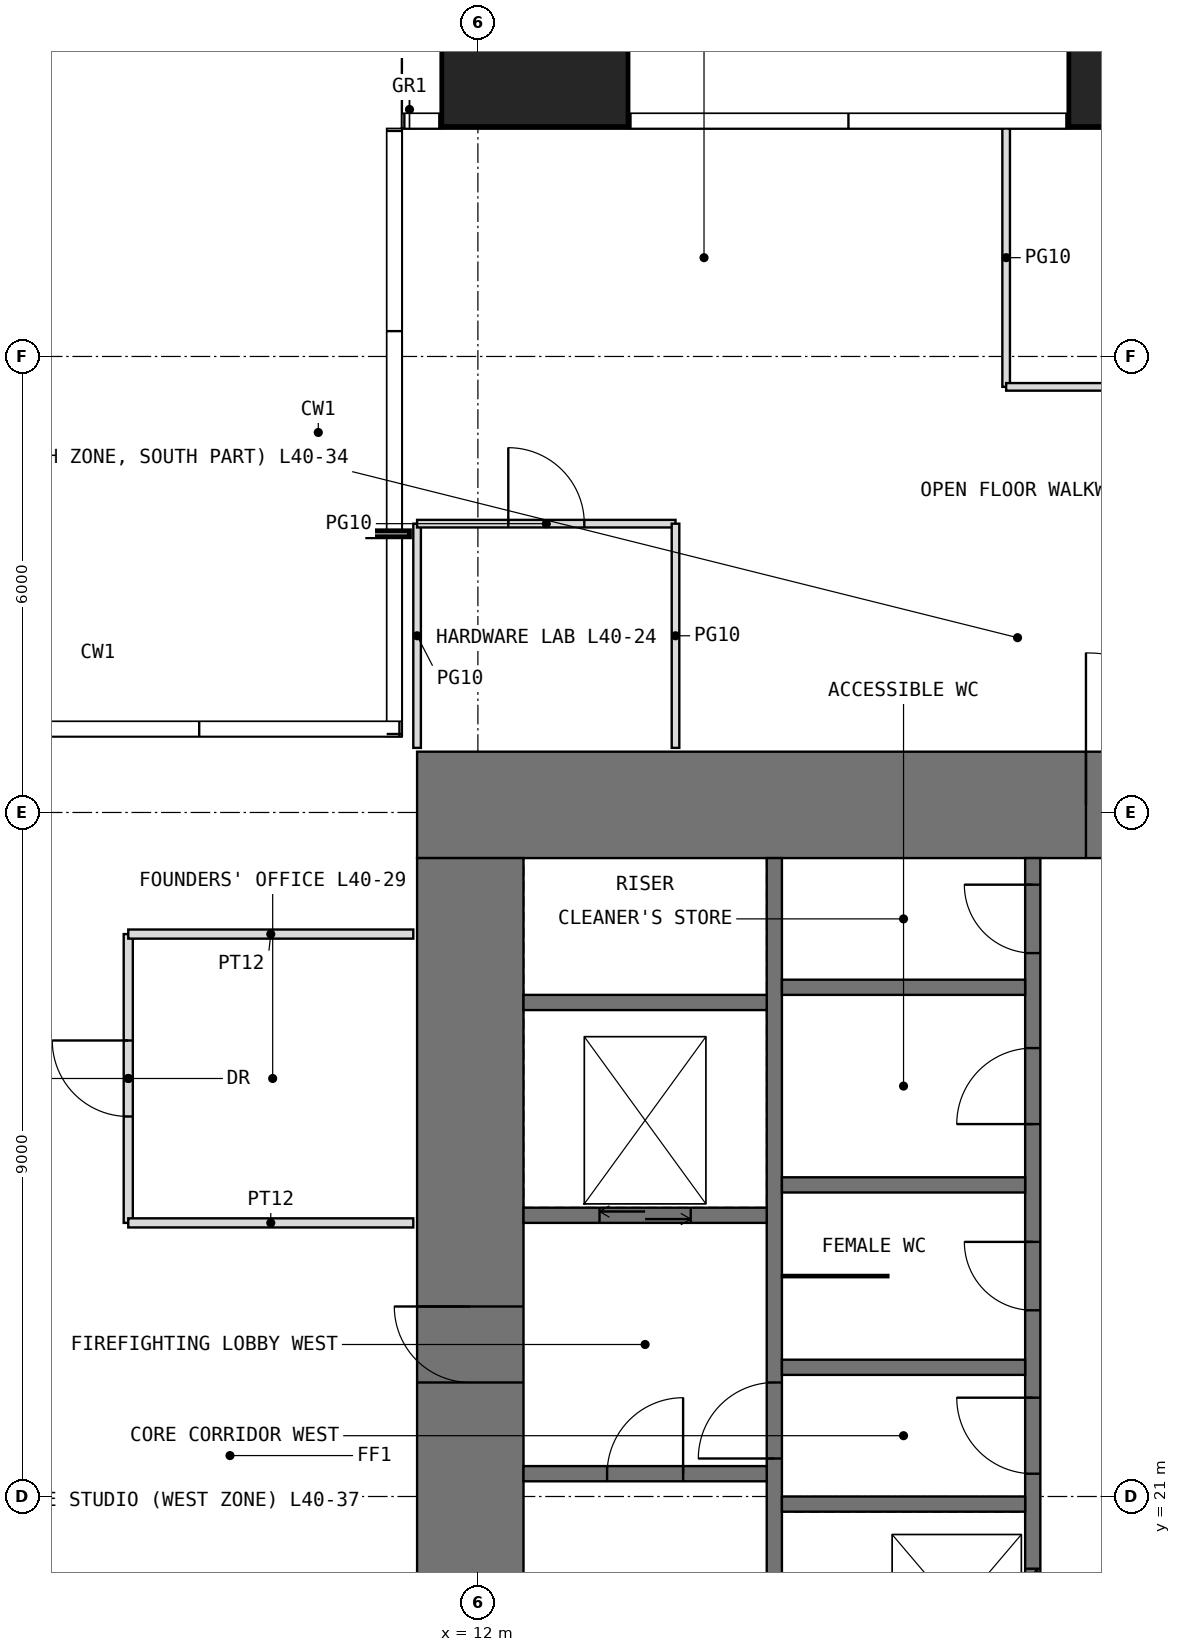
"""IFC4 building model, lengths in metres.
Left out: names, types, materials, properties, quantities, classifications, styles, units other than length and angle.
Written with IfcOpenShell. Run it as: python <this file> out.ifc"""

import sys

from ifc_helpers import new_model, si_unit, direction, frame, frame_2d, origin, origin_2d, place, context, subcontext, project, spatial, rectangle, extrude, element, fill, save


model = new_model("IFC4")
c1 = context("Model", 3, precision=1e-05, world=origin(), true_north=direction((0.0, 1.0)))
c2 = subcontext(c1, "Body", "Model", "MODEL_VIEW")
j1 = project(units=[si_unit("LENGTHUNIT", "METRE"), si_unit("PLANEANGLEUNIT", "RADIAN")], contexts=[c1])
p1 = place(None, origin())
s1 = spatial("IfcSite", under=j1, at=p1, CompositionType="ELEMENT")
p2 = place(p1, origin())
s2 = spatial("IfcBuilding", under=s1, at=p2, CompositionType="ELEMENT")
p3 = place(p2, frame((0.0, 0.0, 170.5)))
s3 = spatial("IfcBuildingStorey", under=s2, at=p3, CompositionType="ELEMENT", Elevation=170.5)
for number, where, z_axis, x_axis in (
    (1, (12.75, 40.25, 0.0), (0.0, 0.0, 1.0), (1.0, 0.0, 0.0)),
    (2, (21.0, 40.25, 0.0), (0.0, 0.0, 1.0), (1.0, 0.0, 0.0)),
):
    element("IfcColumn", number, at=place(p3, frame(where, z_axis=z_axis, x_axis=x_axis)), inside=s3, PredefinedType="COLUMN", context=c2, shape_type="SweptSolid", body=[
        extrude(rectangle(XDim=2.45, YDim=2.45, at=origin_2d()), origin(), (0.0, 0.0, 1.0), 4.0),
    ])
p4 = place(p3, frame((11.2, 30.1, -0.05), z_axis=(0.0, 0.0, 1.0), x_axis=(1.0, 0.0, 0.0)))
e3 = element("IfcWall", 3, at=p4, inside=s3, PredefinedType="SHEAR", context=c2, shape_type="SweptSolid", body=[
    extrude(rectangle(XDim=19.6, YDim=1.4, at=frame_2d((9.8, 0.0))), origin(), (0.0, 0.0, 1.0), 4.0),
])
p5 = place(p4, frame((8.8, 0.0, 0.05)))
e4 = element("IfcOpeningElement", 4, at=p5, cuts=e3, PredefinedType="OPENING", context=c2, shape_type="SweptSolid", body=[
    extrude(rectangle(XDim=2.0, YDim=2.2, at=frame_2d((1.0, 1.1))), frame((0.0, 0.71, 0.0), z_axis=(0.0, -1.0, 0.0), x_axis=(1.0, 0.0, 0.0)), (0.0, 0.0, 1.0), 1.42),
])
p6 = place(p3, frame((11.9, 12.6, -0.05), z_axis=(0.0, 0.0, 1.0), x_axis=(0.0, 1.0, 0.0)))
e5 = element("IfcWall", 5, at=p6, inside=s3, PredefinedType="SHEAR", context=c2, shape_type="SweptSolid", body=[
    extrude(rectangle(XDim=16.8, YDim=1.4, at=frame_2d((8.4, 0.0))), origin(), (0.0, 0.0, 1.0), 4.0),
])
p7 = place(p6, frame((9.9, 0.0, 0.05)))
e6 = element("IfcOpeningElement", 6, at=p7, cuts=e5, PredefinedType="OPENING", context=c2, shape_type="SweptSolid", body=[
    extrude(rectangle(XDim=1.0, YDim=2.2, at=frame_2d((0.5, 1.1))), frame((0.0, 0.71, 0.0), z_axis=(0.0, -1.0, 0.0), x_axis=(1.0, 0.0, 0.0)), (0.0, 0.0, 1.0), 1.42),
])
p8 = place(p3, frame((15.9, 12.6, -0.05), z_axis=(0.0, 0.0, 1.0), x_axis=(0.0, 1.0, 0.0)))
e7 = element("IfcWall", 7, at=p8, inside=s3, PredefinedType="SHEAR", context=c2, shape_type="SweptSolid", body=[
    extrude(rectangle(XDim=16.8, YDim=0.2, at=frame_2d((8.4, 0.0))), origin(), (0.0, 0.0, 1.0), 4.0),
])
p9 = place(p8, frame((8.9, 0.0, 0.05)))
e8 = element("IfcOpeningElement", 8, at=p9, cuts=e7, PredefinedType="OPENING", context=c2, shape_type="SweptSolid", body=[
    extrude(rectangle(XDim=1.0, YDim=2.2, at=frame_2d((0.5, 1.1))), frame((0.0, 0.11, 0.0), z_axis=(0.0, -1.0, 0.0), x_axis=(1.0, 0.0, 0.0)), (0.0, 0.0, 1.0), 0.22),
])
p10 = place(p3, frame((19.3, 12.6, -0.05), z_axis=(0.0, 0.0, 1.0), x_axis=(0.0, 1.0, 0.0)))
e9 = element("IfcWall", 9, at=p10, inside=s3, PredefinedType="SHEAR", context=c2, shape_type="SweptSolid", body=[
    extrude(rectangle(XDim=16.8, YDim=0.2, at=frame_2d((8.4, 0.0))), origin(), (0.0, 0.0, 1.0), 4.0),
])
p11 = place(p10, frame((8.7, 0.0, 0.05)))
e10 = element("IfcOpeningElement", 10, at=p11, cuts=e9, PredefinedType="OPENING", context=c2, shape_type="SweptSolid", body=[
    extrude(rectangle(XDim=1.0, YDim=2.2, at=frame_2d((0.5, 1.1))), frame((0.0, 0.11, 0.0), z_axis=(0.0, -1.0, 0.0), x_axis=(1.0, 0.0, 0.0)), (0.0, 0.0, 1.0), 0.22),
])
p12 = place(p10, frame((10.85, 0.0, 0.05)))
e11 = element("IfcOpeningElement", 11, at=p12, cuts=e9, PredefinedType="OPENING", context=c2, shape_type="SweptSolid", body=[
    extrude(rectangle(XDim=0.9, YDim=2.2, at=frame_2d((0.45, 1.1))), frame((0.0, 0.11, 0.0), z_axis=(0.0, -1.0, 0.0), x_axis=(1.0, 0.0, 0.0)), (0.0, 0.0, 1.0), 0.22),
])
p13 = place(p10, frame((13.3, 0.0, 0.05)))
e12 = element("IfcOpeningElement", 12, at=p13, cuts=e9, PredefinedType="OPENING", context=c2, shape_type="SweptSolid", body=[
    extrude(rectangle(XDim=1.0, YDim=2.2, at=frame_2d((0.5, 1.1))), frame((0.0, 0.11, 0.0), z_axis=(0.0, -1.0, 0.0), x_axis=(1.0, 0.0, 0.0)), (0.0, 0.0, 1.0), 0.22),
])
p14 = place(p10, frame((15.55, 0.0, 0.05)))
e13 = element("IfcOpeningElement", 13, at=p14, cuts=e9, PredefinedType="OPENING", context=c2, shape_type="SweptSolid", body=[
    extrude(rectangle(XDim=0.9, YDim=2.2, at=frame_2d((0.45, 1.1))), frame((0.0, 0.11, 0.0), z_axis=(0.0, -1.0, 0.0), x_axis=(1.0, 0.0, 0.0)), (0.0, 0.0, 1.0), 0.22),
])
p15 = place(p10, frame((0.75, 0.0, 0.05)))
e14 = element("IfcOpeningElement", 14, at=p15, cuts=e9, PredefinedType="OPENING", context=c2, shape_type="SweptSolid", body=[
    extrude(rectangle(XDim=1.1, YDim=2.2, at=frame_2d((0.55, 1.1))), frame((0.0, 0.11, 0.0), z_axis=(0.0, -1.0, 0.0), x_axis=(1.0, 0.0, 0.0)), (0.0, 0.0, 1.0), 0.22),
])
p16 = place(p10, frame((3.55, 0.0, 0.05)))
e15 = element("IfcOpeningElement", 15, at=p16, cuts=e9, PredefinedType="OPENING", context=c2, shape_type="SweptSolid", body=[
    extrude(rectangle(XDim=1.1, YDim=2.2, at=frame_2d((0.55, 1.1))), frame((0.0, 0.11, 0.0), z_axis=(0.0, -1.0, 0.0), x_axis=(1.0, 0.0, 0.0)), (0.0, 0.0, 1.0), 0.22),
])
p17 = place(p10, frame((6.35, 0.0, 0.05)))
e16 = element("IfcOpeningElement", 16, at=p17, cuts=e9, PredefinedType="OPENING", context=c2, shape_type="SweptSolid", body=[
    extrude(rectangle(XDim=1.1, YDim=2.2, at=frame_2d((0.55, 1.1))), frame((0.0, 0.11, 0.0), z_axis=(0.0, -1.0, 0.0), x_axis=(1.0, 0.0, 0.0)), (0.0, 0.0, 1.0), 0.22),
])
p18 = place(p3, frame((12.6, 21.3, -0.05), z_axis=(0.0, 0.0, 1.0), x_axis=(1.0, 0.0, 0.0)))
e17 = element("IfcWall", 17, at=p18, inside=s3, PredefinedType="SHEAR", context=c2, shape_type="SweptSolid", body=[
    extrude(rectangle(XDim=3.2, YDim=0.2, at=frame_2d((1.6, 0.0))), origin(), (0.0, 0.0, 1.0), 4.0),
])
p19 = place(p18, frame((1.1, 0.0, 0.05)))
e18 = element("IfcOpeningElement", 18, at=p19, cuts=e17, PredefinedType="OPENING", context=c2, shape_type="SweptSolid", body=[
    extrude(rectangle(XDim=1.0, YDim=2.2, at=frame_2d((0.5, 1.1))), frame((0.0, 0.11, 0.0), z_axis=(0.0, -1.0, 0.0), x_axis=(1.0, 0.0, 0.0)), (0.0, 0.0, 1.0), 0.22),
])
p20 = place(p3, frame((12.6, 24.7, -0.05), z_axis=(0.0, 0.0, 1.0), x_axis=(1.0, 0.0, 0.0)))
e19 = element("IfcWall", 19, at=p20, inside=s3, PredefinedType="SHEAR", context=c2, shape_type="SweptSolid", body=[
    extrude(rectangle(XDim=3.2, YDim=0.2, at=frame_2d((1.6, 0.0))), origin(), (0.0, 0.0, 1.0), 4.0),
])
p21 = place(p20, frame((1.0, 0.0, 0.05)))
e20 = element("IfcOpeningElement", 20, at=p21, cuts=e19, PredefinedType="OPENING", context=c2, shape_type="SweptSolid", body=[
    extrude(rectangle(XDim=1.2, YDim=2.2, at=frame_2d((0.6, 1.1))), frame((0.0, 0.11, 0.0), z_axis=(0.0, -1.0, 0.0), x_axis=(1.0, 0.0, 0.0)), (0.0, 0.0, 1.0), 0.22),
])
for number, where, z_axis, x_axis in (
    (21, (12.6, 27.5, -0.05), (0.0, 0.0, 1.0), (1.0, 0.0, 0.0)),
    (22, (16.0, 20.9, -0.05), (0.0, 0.0, 1.0), (1.0, 0.0, 0.0)),
    (23, (16.0, 22.7, -0.05), (0.0, 0.0, 1.0), (1.0, 0.0, 0.0)),
    (24, (16.0, 25.1, -0.05), (0.0, 0.0, 1.0), (1.0, 0.0, 0.0)),
    (25, (16.0, 27.7, -0.05), (0.0, 0.0, 1.0), (1.0, 0.0, 0.0)),
):
    element("IfcWall", number, at=place(p3, frame(where, z_axis=z_axis, x_axis=x_axis)), inside=s3, PredefinedType="SHEAR", context=c2, shape_type="SweptSolid", body=[
        extrude(rectangle(XDim=3.2, YDim=0.2, at=frame_2d((1.6, 0.0))), origin(), (0.0, 0.0, 1.0), 4.0),
    ])
p22 = place(p3, frame((16.0, 23.9, 0.0), z_axis=(0.0, 0.0, 1.0), x_axis=(1.0, 0.0, 0.0)))
e26 = element("IfcWall", 26, at=p22, inside=s3, PredefinedType="PARTITIONING", context=c2, shape_type="SweptSolid", body=[
    extrude(rectangle(XDim=1.4, YDim=0.03, at=frame_2d((0.7, 0.0))), origin(), (0.0, 0.0, 1.0), 3.75),
])
p23 = place(p3, frame((7.4, 24.6, 0.0), z_axis=(0.0, 0.0, 1.0), x_axis=(0.0, 1.0, 0.0)))
e27 = element("IfcWall", 27, at=p23, inside=s3, PredefinedType="PARTITIONING", context=c2, shape_type="SweptSolid", body=[
    extrude(rectangle(XDim=3.8, YDim=0.12, at=frame_2d((1.9, 0.0))), origin(), (0.0, 0.0, 1.0), 3.75),
])
p24 = place(p23, frame((1.4, 0.0, 0.0)))
e28 = element("IfcOpeningElement", 28, at=p24, cuts=e27, PredefinedType="OPENING", context=c2, shape_type="SweptSolid", body=[
    extrude(rectangle(XDim=1.0, YDim=2.2, at=frame_2d((0.5, 1.1))), frame((0.0, 0.07, 0.0), z_axis=(0.0, -1.0, 0.0), x_axis=(1.0, 0.0, 0.0)), (0.0, 0.0, 1.0), 0.14),
])
for number, where, z_axis, x_axis in (
    (29, (7.4, 24.6, 0.0), (0.0, 0.0, 1.0), (1.0, 0.0, 0.0)),
    (30, (7.4, 28.4, 0.0), (0.0, 0.0, 1.0), (1.0, 0.0, 0.0)),
):
    element("IfcWall", number, at=place(p3, frame(where, z_axis=z_axis, x_axis=x_axis)), inside=s3, PredefinedType="PARTITIONING", context=c2, shape_type="SweptSolid", body=[
        extrude(rectangle(XDim=3.75, YDim=0.12, at=frame_2d((1.875, 0.0))), origin(), (0.0, 0.0, 1.0), 3.75),
    ])
p25 = place(p3, frame((11.2, 30.85, 0.0), z_axis=(0.0, 0.0, 1.0), x_axis=(0.0, 1.0, 0.0)))
e31 = element("IfcWall", 31, at=p25, inside=s3, PredefinedType="PARTITIONING", context=c2, shape_type="SweptSolid", body=[
    extrude(rectangle(XDim=2.95, YDim=0.1, at=frame_2d((1.475, 0.0))), origin(), (0.0, 0.0, 1.0), 3.75),
])
p26 = place(p3, frame((11.2, 33.8, 0.0), z_axis=(0.0, 0.0, 1.0), x_axis=(1.0, 0.0, 0.0)))
e32 = element("IfcWall", 32, at=p26, inside=s3, PredefinedType="PARTITIONING", context=c2, shape_type="SweptSolid", body=[
    extrude(rectangle(XDim=3.4, YDim=0.1, at=frame_2d((1.7, 0.0))), origin(), (0.0, 0.0, 1.0), 3.75),
])
p27 = place(p26, frame((1.2, 0.0, 0.0)))
e33 = element("IfcOpeningElement", 33, at=p27, cuts=e32, PredefinedType="OPENING", context=c2, shape_type="SweptSolid", body=[
    extrude(rectangle(XDim=1.0, YDim=2.4, at=frame_2d((0.5, 1.2))), frame((0.0, 0.06, 0.0), z_axis=(0.0, -1.0, 0.0), x_axis=(1.0, 0.0, 0.0)), (0.0, 0.0, 1.0), 0.12),
])
p28 = place(p3, frame((14.6, 30.85, 0.0), z_axis=(0.0, 0.0, 1.0), x_axis=(0.0, 1.0, 0.0)))
e34 = element("IfcWall", 34, at=p28, inside=s3, PredefinedType="PARTITIONING", context=c2, shape_type="SweptSolid", body=[
    extrude(rectangle(XDim=2.95, YDim=0.1, at=frame_2d((1.475, 0.0))), origin(), (0.0, 0.0, 1.0), 3.75),
])
p29 = place(p3, frame((18.95, 35.6, 0.0), z_axis=(0.0, 0.0, 1.0), x_axis=(0.0, 1.0, 0.0)))
e35 = element("IfcWall", 35, at=p29, inside=s3, PredefinedType="PARTITIONING", context=c2, shape_type="SweptSolid", body=[
    extrude(rectangle(XDim=3.4, YDim=0.1, at=frame_2d((1.7, 0.0))), origin(), (0.0, 0.0, 1.0), 3.75),
])
p30 = place(p3, frame((18.95, 35.6, 0.0), z_axis=(0.0, 0.0, 1.0), x_axis=(1.0, 0.0, 0.0)))
e36 = element("IfcWall", 36, at=p30, inside=s3, PredefinedType="PARTITIONING", context=c2, shape_type="SweptSolid", body=[
    extrude(rectangle(XDim=9.25, YDim=0.1, at=frame_2d((4.625, 0.0))), origin(), (0.0, 0.0, 1.0), 3.75),
])
p31 = place(p30, frame((3.725, 0.0, 0.0)))
e37 = element("IfcOpeningElement", 37, at=p31, cuts=e36, PredefinedType="OPENING", context=c2, shape_type="SweptSolid", body=[
    extrude(rectangle(XDim=1.0, YDim=2.4, at=frame_2d((0.5, 1.2))), frame((0.0, 0.06, 0.0), z_axis=(0.0, -1.0, 0.0), x_axis=(1.0, 0.0, 0.0)), (0.0, 0.0, 1.0), 0.12),
])
p32 = place(p5, origin())
e38 = element("IfcDoor", 38, at=p32, inside=s3, OperationType="DOUBLE_DOOR_SINGLE_SWING", PredefinedType="DOOR", context=c2, shape_type="SweptSolid", body=[
    extrude(rectangle(XDim=2.0, YDim=2.2, at=frame_2d((1.0, 1.1))), frame((0.0, 0.025, 0.0), z_axis=(0.0, -1.0, 0.0), x_axis=(1.0, 0.0, 0.0)), (0.0, 0.0, 1.0), 0.05),
])
fill(e4, e38)
p33 = place(p7, origin())
e39 = element("IfcDoor", 39, at=p33, inside=s3, OperationType="SINGLE_SWING_RIGHT", PredefinedType="DOOR", context=c2, shape_type="SweptSolid", body=[
    extrude(rectangle(XDim=1.0, YDim=2.2, at=frame_2d((0.5, 1.1))), frame((0.0, 0.025, 0.0), z_axis=(0.0, -1.0, 0.0), x_axis=(1.0, 0.0, 0.0)), (0.0, 0.0, 1.0), 0.05),
])
fill(e6, e39)
p34 = place(p19, origin())
e40 = element("IfcDoor", 40, at=p34, inside=s3, OperationType="SINGLE_SWING_RIGHT", PredefinedType="DOOR", context=c2, shape_type="SweptSolid", body=[
    extrude(rectangle(XDim=1.0, YDim=2.2, at=frame_2d((0.5, 1.1))), frame((0.0, 0.025, 0.0), z_axis=(0.0, -1.0, 0.0), x_axis=(1.0, 0.0, 0.0)), (0.0, 0.0, 1.0), 0.05),
])
fill(e18, e40)
p35 = place(p9, origin())
e41 = element("IfcDoor", 41, at=p35, inside=s3, OperationType="SINGLE_SWING_LEFT", PredefinedType="DOOR", context=c2, shape_type="SweptSolid", body=[
    extrude(rectangle(XDim=1.0, YDim=2.2, at=frame_2d((0.5, 1.1))), frame((0.0, 0.025, 0.0), z_axis=(0.0, -1.0, 0.0), x_axis=(1.0, 0.0, 0.0)), (0.0, 0.0, 1.0), 0.05),
])
fill(e8, e41)
p36 = place(p11, origin())
e42 = element("IfcDoor", 42, at=p36, inside=s3, OperationType="SINGLE_SWING_RIGHT", PredefinedType="DOOR", context=c2, shape_type="SweptSolid", body=[
    extrude(rectangle(XDim=1.0, YDim=2.2, at=frame_2d((0.5, 1.1))), frame((0.0, 0.025, 0.0), z_axis=(0.0, -1.0, 0.0), x_axis=(1.0, 0.0, 0.0)), (0.0, 0.0, 1.0), 0.05),
])
fill(e10, e42)
p37 = place(p12, origin())
e43 = element("IfcDoor", 43, at=p37, inside=s3, OperationType="SINGLE_SWING_RIGHT", PredefinedType="DOOR", context=c2, shape_type="SweptSolid", body=[
    extrude(rectangle(XDim=0.9, YDim=2.2, at=frame_2d((0.45, 1.1))), frame((0.0, 0.025, 0.0), z_axis=(0.0, -1.0, 0.0), x_axis=(1.0, 0.0, 0.0)), (0.0, 0.0, 1.0), 0.05),
])
fill(e11, e43)
p38 = place(p13, origin())
e44 = element("IfcDoor", 44, at=p38, inside=s3, OperationType="SINGLE_SWING_LEFT", PredefinedType="DOOR", context=c2, shape_type="SweptSolid", body=[
    extrude(rectangle(XDim=1.0, YDim=2.2, at=frame_2d((0.5, 1.1))), frame((0.0, 0.025, 0.0), z_axis=(0.0, -1.0, 0.0), x_axis=(1.0, 0.0, 0.0)), (0.0, 0.0, 1.0), 0.05),
])
fill(e12, e44)
p39 = place(p14, origin())
e45 = element("IfcDoor", 45, at=p39, inside=s3, OperationType="SINGLE_SWING_RIGHT", PredefinedType="DOOR", context=c2, shape_type="SweptSolid", body=[
    extrude(rectangle(XDim=0.9, YDim=2.2, at=frame_2d((0.45, 1.1))), frame((0.0, 0.025, 0.0), z_axis=(0.0, -1.0, 0.0), x_axis=(1.0, 0.0, 0.0)), (0.0, 0.0, 1.0), 0.05),
])
fill(e13, e45)
p40 = place(p27, origin())
e46 = element("IfcDoor", 46, at=p40, inside=s3, OperationType="SINGLE_SWING_LEFT", PredefinedType="DOOR", context=c2, shape_type="SweptSolid", body=[
    extrude(rectangle(XDim=1.0, YDim=2.4, at=frame_2d((0.5, 1.2))), frame((0.0, 0.025, 0.0), z_axis=(0.0, -1.0, 0.0), x_axis=(1.0, 0.0, 0.0)), (0.0, 0.0, 1.0), 0.05),
])
fill(e33, e46)
p41 = place(p24, origin())
e47 = element("IfcDoor", 47, at=p41, inside=s3, OperationType="SINGLE_SWING_RIGHT", PredefinedType="DOOR", context=c2, shape_type="SweptSolid", body=[
    extrude(rectangle(XDim=1.0, YDim=2.2, at=frame_2d((0.5, 1.1))), frame((0.0, 0.025, 0.0), z_axis=(0.0, -1.0, 0.0), x_axis=(1.0, 0.0, 0.0)), (0.0, 0.0, 1.0), 0.05),
])
fill(e28, e47)
p42 = place(p17, origin())
e48 = element("IfcDoor", 48, at=p42, inside=s3, OperationType="DOUBLE_DOOR_SLIDING", PredefinedType="DOOR", context=c2, shape_type="SweptSolid", body=[
    extrude(rectangle(XDim=1.1, YDim=2.2, at=frame_2d((0.55, 1.1))), frame((0.0, 0.025, 0.0), z_axis=(0.0, -1.0, 0.0), x_axis=(1.0, 0.0, 0.0)), (0.0, 0.0, 1.0), 0.05),
])
fill(e16, e48)
p43 = place(p21, origin())
e49 = element("IfcDoor", 49, at=p43, inside=s3, OperationType="DOUBLE_DOOR_SLIDING", PredefinedType="DOOR", context=c2, shape_type="SweptSolid", body=[
    extrude(rectangle(XDim=1.2, YDim=2.2, at=frame_2d((0.6, 1.1))), frame((0.0, 0.025, 0.0), z_axis=(0.0, -1.0, 0.0), x_axis=(1.0, 0.0, 0.0)), (0.0, 0.0, 1.0), 0.05),
])
fill(e20, e49)
save(model, sys.argv[1])
